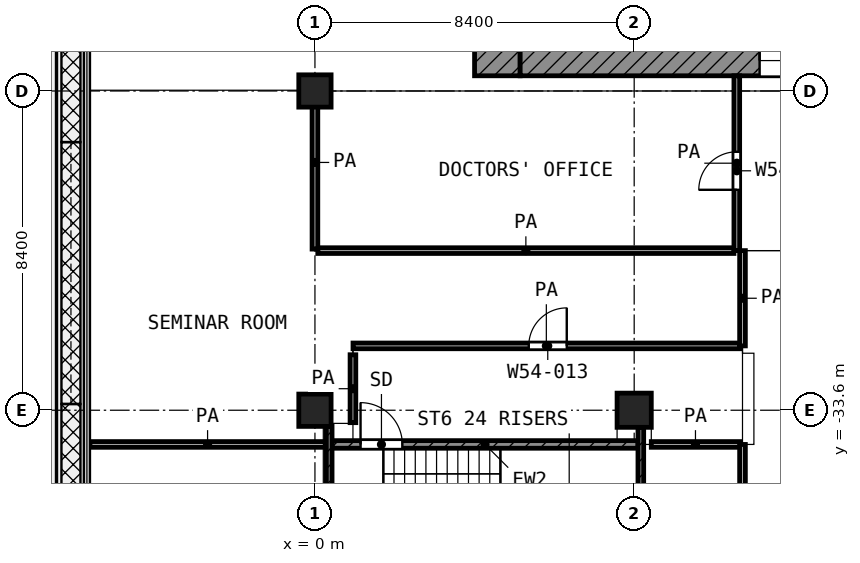
"""IFC4 building model, lengths in metres.
Left out: names, types, materials, properties, quantities, classifications, styles, units other than length and angle.
Written with IfcOpenShell. Run it as: python <this file> out.ifc"""

import sys

from ifc_helpers import new_model, si_unit, direction, frame, frame_2d, origin, origin_2d, place, context, subcontext, project, spatial, rectangle, extrude, element, fill, save


model = new_model("IFC4")
c1 = context("Model", 3, precision=1e-05, world=origin(), true_north=direction((0.0, 1.0)))
c2 = subcontext(c1, "Body", "Model", "MODEL_VIEW")
j1 = project(units=[si_unit("LENGTHUNIT", "METRE"), si_unit("PLANEANGLEUNIT", "RADIAN")], contexts=[c1])
p1 = place(None, origin())
s1 = spatial("IfcSite", under=j1, at=p1, CompositionType="ELEMENT")
p2 = place(p1, origin())
s2 = spatial("IfcBuilding", under=s1, at=p2, CompositionType="ELEMENT")
p3 = place(p2, frame((0.0, 0.0, 255.8)))
s3 = spatial("IfcBuildingStorey", under=s2, at=p3, CompositionType="ELEMENT", Elevation=255.8)
for number, where, z_axis, x_axis in (
    (1, (0.0, -25.2, 0.0), (0.0, 0.0, 1.0), (1.0, 0.0, 0.0)),
    (2, (0.0, -33.6, 0.0), (0.0, 0.0, 1.0), (1.0, 0.0, 0.0)),
):
    element("IfcColumn", number, at=place(p3, frame(where, z_axis=z_axis, x_axis=x_axis)), inside=s3, PredefinedType="COLUMN", context=c2, shape_type="SweptSolid", body=[
        extrude(rectangle(XDim=0.85, YDim=0.85, at=origin_2d()), origin(), (0.0, 0.0, 1.0), 4.2),
    ])
p4 = place(p3, frame((8.4, -33.6, 0.0), z_axis=(0.0, 0.0, 1.0), x_axis=(1.0, 0.0, 0.0)))
e3 = element("IfcColumn", 3, at=p4, inside=s3, PredefinedType="COLUMN", context=c2, shape_type="SweptSolid", body=[
    extrude(rectangle(XDim=0.9, YDim=0.9, at=origin_2d()), origin(), (0.0, 0.0, 1.0), 4.2),
])
p5 = place(p3, frame((4.8, -24.8, 0.0), z_axis=(0.0, 0.0, 1.0), x_axis=(0.0, 1.0, 0.0)))
e4 = element("IfcWall", 4, at=p5, inside=s3, PredefinedType="SHEAR", context=c2, shape_type="SweptSolid", body=[
    extrude(rectangle(XDim=19.4, YDim=1.2, at=frame_2d((9.7, 0.0))), origin(), (0.0, 0.0, 1.0), 3.6),
])
p6 = place(p5, frame((11.25, 0.0, 0.0)))
e5 = element("IfcOpeningElement", 5, at=p6, cuts=e4, PredefinedType="OPENING", context=c2, shape_type="SweptSolid", body=[
    extrude(rectangle(XDim=1.1, YDim=2.1, at=frame_2d((0.55, 1.05))), frame((0.0, 0.61, 0.0), z_axis=(0.0, -1.0, 0.0), x_axis=(1.0, 0.0, 0.0)), (0.0, 0.0, 1.0), 1.22),
])
p7 = place(p5, frame((1.95, 0.0, 0.0)))
e6 = element("IfcOpeningElement", 6, at=p7, cuts=e4, PredefinedType="OPENING", context=c2, shape_type="SweptSolid", body=[
    extrude(rectangle(XDim=1.1, YDim=2.1, at=frame_2d((0.55, 1.05))), frame((0.0, 0.61, 0.0), z_axis=(0.0, -1.0, 0.0), x_axis=(1.0, 0.0, 0.0)), (0.0, 0.0, 1.0), 1.22),
])
p8 = place(p3, frame((5.4, -24.4, 0.0), z_axis=(0.0, 0.0, 1.0), x_axis=(1.0, 0.0, 0.0)))
e7 = element("IfcWall", 7, at=p8, inside=s3, PredefinedType="SHEAR", context=c2, shape_type="SweptSolid", body=[
    extrude(rectangle(XDim=18.6, YDim=0.8, at=frame_2d((9.3, 0.0))), origin(), (0.0, 0.0, 1.0), 3.6),
])
p9 = place(p8, frame((6.3, 0.0, 0.0)))
e8 = element("IfcOpeningElement", 8, at=p9, cuts=e7, PredefinedType="OPENING", context=c2, shape_type="SweptSolid", body=[
    extrude(rectangle(XDim=1.8, YDim=2.1, at=frame_2d((0.9, 1.05))), frame((0.0, 0.41, 0.0), z_axis=(0.0, -1.0, 0.0), x_axis=(1.0, 0.0, 0.0)), (0.0, 0.0, 1.0), 0.82),
])
p10 = place(p3, frame((0.375, -40.05, 0.0), z_axis=(0.0, 0.0, 1.0), x_axis=(0.0, 1.0, 0.0)))
e9 = element("IfcWall", 9, at=p10, inside=s3, PredefinedType="SHEAR", context=c2, shape_type="SweptSolid", body=[
    extrude(rectangle(XDim=6.025, YDim=0.15, at=frame_2d((3.013, 0.0))), origin(), (0.0, 0.0, 1.0), 3.6),
])
p11 = place(p3, frame((8.575, -40.05, 0.0), z_axis=(0.0, 0.0, 1.0), x_axis=(0.0, 1.0, 0.0)))
e10 = element("IfcWall", 10, at=p11, inside=s3, PredefinedType="SHEAR", context=c2, shape_type="SweptSolid", body=[
    extrude(rectangle(XDim=6.0, YDim=0.15, at=frame_2d((3.0, 0.0))), origin(), (0.0, 0.0, 1.0), 3.6),
])
p12 = place(p3, frame((0.45, -34.5, 0.0), z_axis=(0.0, 0.0, 1.0), x_axis=(1.0, 0.0, 0.0)))
e11 = element("IfcWall", 11, at=p12, inside=s3, PredefinedType="SHEAR", context=c2, shape_type="SweptSolid", body=[
    extrude(rectangle(XDim=8.05, YDim=0.2, at=frame_2d((4.025, 0.0))), origin(), (0.0, 0.0, 1.0), 3.6),
])
p13 = place(p12, frame((0.75, 0.0, 0.0)))
e12 = element("IfcOpeningElement", 12, at=p13, cuts=e11, PredefinedType="OPENING", context=c2, shape_type="SweptSolid", body=[
    extrude(rectangle(XDim=1.1, YDim=2.1, at=frame_2d((0.55, 1.05))), frame((0.0, 0.11, 0.0), z_axis=(0.0, -1.0, 0.0), x_axis=(1.0, 0.0, 0.0)), (0.0, 0.0, 1.0), 0.22),
])
p14 = place(p3, frame((-5.92, -34.5, 0.0), z_axis=(0.0, 0.0, 1.0), x_axis=(1.0, 0.0, 0.0)))
e13 = element("IfcWall", 13, at=p14, inside=s3, PredefinedType="PARTITIONING", context=c2, shape_type="SweptSolid", body=[
    extrude(rectangle(XDim=6.19, YDim=0.15, at=frame_2d((3.095, 0.0))), origin(), (0.0, 0.0, 1.0), 3.6),
])
p15 = place(p3, frame((8.85, -34.5, 0.0), z_axis=(0.0, 0.0, 1.0), x_axis=(1.0, 0.0, 0.0)))
e14 = element("IfcWall", 14, at=p15, inside=s3, PredefinedType="PARTITIONING", context=c2, shape_type="SweptSolid", body=[
    extrude(rectangle(XDim=2.325, YDim=0.15, at=frame_2d((1.163, 0.0))), origin(), (0.0, 0.0, 1.0), 3.6),
])
p16 = place(p3, frame((1.002, -31.907, 0.0), z_axis=(0.0, 0.0, 1.0), x_axis=(1.0, 0.0, 0.0)))
e15 = element("IfcWall", 15, at=p16, inside=s3, PredefinedType="PARTITIONING", context=c2, shape_type="SweptSolid", body=[
    extrude(rectangle(XDim=10.173, YDim=0.15, at=frame_2d((5.086, 0.0))), origin(), (0.0, 0.0, 1.0), 3.6),
])
p17 = place(p16, frame((4.624, 0.0, 0.0)))
e16 = element("IfcOpeningElement", 16, at=p17, cuts=e15, PredefinedType="OPENING", context=c2, shape_type="SweptSolid", body=[
    extrude(rectangle(XDim=1.0, YDim=2.1, at=frame_2d((0.5, 1.05))), frame((0.0, 0.085, 0.0), z_axis=(0.0, -1.0, 0.0), x_axis=(1.0, 0.0, 0.0)), (0.0, 0.0, 1.0), 0.17),
])
p18 = place(p3, frame((0.075, -29.4, 0.0), z_axis=(0.0, 0.0, 1.0), x_axis=(1.0, 0.0, 0.0)))
e17 = element("IfcWall", 17, at=p18, inside=s3, PredefinedType="PARTITIONING", context=c2, shape_type="SweptSolid", body=[
    extrude(rectangle(XDim=10.95, YDim=0.15, at=frame_2d((5.475, 0.0))), origin(), (0.0, 0.0, 1.0), 3.6),
])
p19 = place(p3, frame((0.0, -29.36, 0.0), z_axis=(0.0, 0.0, 1.0), x_axis=(0.0, 1.0, 0.0)))
e18 = element("IfcWall", 18, at=p19, inside=s3, PredefinedType="PARTITIONING", context=c2, shape_type="SweptSolid", body=[
    extrude(rectangle(XDim=4.56, YDim=0.15, at=frame_2d((2.28, 0.0))), origin(), (0.0, 0.0, 1.0), 3.6),
])
p20 = place(p3, frame((1.0, -33.927, 0.0), z_axis=(0.0, 0.0, 1.0), x_axis=(0.0, 1.0, 0.0)))
e19 = element("IfcWall", 19, at=p20, inside=s3, PredefinedType="PARTITIONING", context=c2, shape_type="SweptSolid", body=[
    extrude(rectangle(XDim=1.787, YDim=0.15, at=frame_2d((0.894, 0.0))), origin(), (0.0, 0.0, 1.0), 3.6),
])
p21 = place(p3, frame((11.1, -29.4, 0.0), z_axis=(0.0, 0.0, 1.0), x_axis=(0.0, 1.0, 0.0)))
e20 = element("IfcWall", 20, at=p21, inside=s3, PredefinedType="PARTITIONING", context=c2, shape_type="SweptSolid", body=[
    extrude(rectangle(XDim=4.6, YDim=0.15, at=frame_2d((2.3, 0.0))), origin(), (0.0, 0.0, 1.0), 3.6),
])
p22 = place(p21, frame((1.6, 0.0, 0.0)))
e21 = element("IfcOpeningElement", 21, at=p22, cuts=e20, PredefinedType="OPENING", context=c2, shape_type="SweptSolid", body=[
    extrude(rectangle(XDim=1.0, YDim=2.1, at=frame_2d((0.5, 1.05))), frame((0.0, 0.085, 0.0), z_axis=(0.0, -1.0, 0.0), x_axis=(1.0, 0.0, 0.0)), (0.0, 0.0, 1.0), 0.17),
])
p23 = place(p3, frame((11.25, -39.95, 0.0), z_axis=(0.0, 0.0, 1.0), x_axis=(0.0, 1.0, 0.0)))
e22 = element("IfcWall", 22, at=p23, inside=s3, PredefinedType="PARTITIONING", context=c2, shape_type="SweptSolid", body=[
    extrude(rectangle(XDim=5.45, YDim=0.15, at=frame_2d((2.725, 0.0))), origin(), (0.0, 0.0, 1.0), 3.6),
])
p24 = place(p23, frame((3.3, 0.0, 0.0)))
e23 = element("IfcOpeningElement", 23, at=p24, cuts=e22, PredefinedType="OPENING", context=c2, shape_type="SweptSolid", body=[
    extrude(rectangle(XDim=1.0, YDim=2.1, at=frame_2d((0.5, 1.05))), frame((0.0, 0.085, 0.0), z_axis=(0.0, -1.0, 0.0), x_axis=(1.0, 0.0, 0.0)), (0.0, 0.0, 1.0), 0.17),
])
p25 = place(p3, frame((11.25, -31.907, 0.0), z_axis=(0.0, 0.0, 1.0), x_axis=(0.0, 1.0, 0.0)))
e24 = element("IfcWall", 24, at=p25, inside=s3, PredefinedType="PARTITIONING", context=c2, shape_type="SweptSolid", body=[
    extrude(rectangle(XDim=2.507, YDim=0.15, at=frame_2d((1.253, 0.0))), origin(), (0.0, 0.0, 1.0), 3.6),
])
p26 = place(p9, origin())
e25 = element("IfcDoor", 25, at=p26, inside=s3, OperationType="DOUBLE_DOOR_SINGLE_SWING", PredefinedType="DOOR", context=c2, shape_type="SweptSolid", body=[
    extrude(rectangle(XDim=1.8, YDim=2.1, at=frame_2d((0.9, 1.05))), frame((0.0, 0.025, 0.0), z_axis=(0.0, -1.0, 0.0), x_axis=(1.0, 0.0, 0.0)), (0.0, 0.0, 1.0), 0.05),
])
fill(e8, e25)
p27 = place(p13, origin())
e26 = element("IfcDoor", 26, at=p27, inside=s3, OperationType="SINGLE_SWING_LEFT", PredefinedType="DOOR", context=c2, shape_type="SweptSolid", body=[
    extrude(rectangle(XDim=1.1, YDim=2.1, at=frame_2d((0.55, 1.05))), frame((0.0, 0.025, 0.0), z_axis=(0.0, -1.0, 0.0), x_axis=(1.0, 0.0, 0.0)), (0.0, 0.0, 1.0), 0.05),
])
fill(e12, e26)
p28 = place(p22, origin())
e27 = element("IfcDoor", 27, at=p28, inside=s3, OperationType="SINGLE_SWING_LEFT", PredefinedType="DOOR", context=c2, shape_type="SweptSolid", body=[
    extrude(rectangle(XDim=1.0, YDim=2.1, at=frame_2d((0.5, 1.05))), frame((0.0, 0.025, 0.0), z_axis=(0.0, -1.0, 0.0), x_axis=(1.0, 0.0, 0.0)), (0.0, 0.0, 1.0), 0.05),
])
fill(e21, e27)
p29 = place(p17, origin())
e28 = element("IfcDoor", 28, at=p29, inside=s3, OperationType="SINGLE_SWING_RIGHT", PredefinedType="DOOR", context=c2, shape_type="SweptSolid", body=[
    extrude(rectangle(XDim=1.0, YDim=2.1, at=frame_2d((0.5, 1.05))), frame((0.0, 0.025, 0.0), z_axis=(0.0, -1.0, 0.0), x_axis=(1.0, 0.0, 0.0)), (0.0, 0.0, 1.0), 0.05),
])
fill(e16, e28)
save(model, sys.argv[1])
